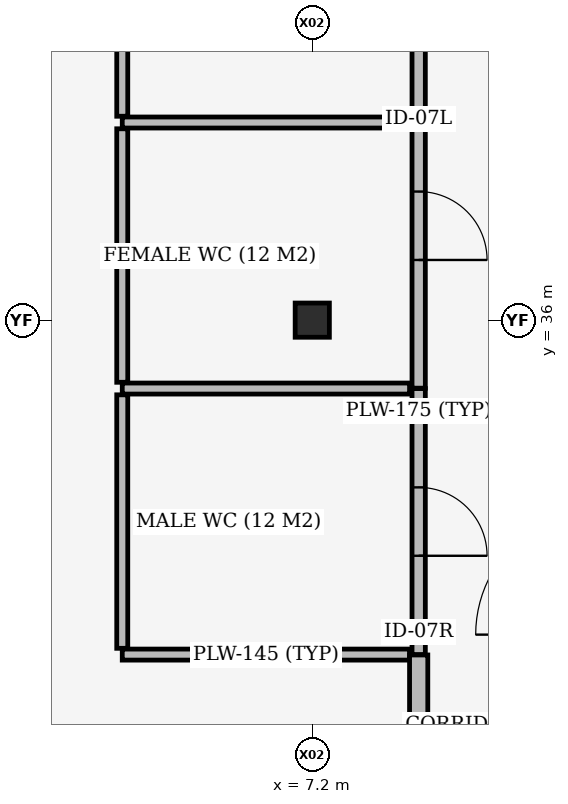
"""IFC4 building model, lengths in metres.
Left out: names, types, materials, properties, quantities, classifications, styles, units other than length and angle.
Written with IfcOpenShell. Run it as: python <this file> out.ifc"""

import sys

from ifc_helpers import new_model, si_unit, direction, frame, frame_2d, origin, origin_2d, place, context, subcontext, project, spatial, rectangle, extrude, element, fill, save


model = new_model("IFC4")
c1 = context("Model", 3, precision=1e-05, world=origin(), true_north=direction((0.0, 1.0)))
c2 = subcontext(c1, "Body", "Model", "MODEL_VIEW")
j1 = project(units=[si_unit("LENGTHUNIT", "METRE"), si_unit("PLANEANGLEUNIT", "RADIAN")], contexts=[c1])
p1 = place(None, origin())
s1 = spatial("IfcSite", under=j1, at=p1, CompositionType="ELEMENT")
p2 = place(p1, origin())
s2 = spatial("IfcBuilding", under=s1, at=p2, CompositionType="ELEMENT")
p3 = place(p2, frame((0.0, 0.0, -4.5)))
s3 = spatial("IfcBuildingStorey", under=s2, at=p3, CompositionType="ELEMENT", Elevation=-4.5)
p4 = place(p3, frame((7.2, 36.0, -0.42), z_axis=(0.0, 0.0, 1.0), x_axis=(1.0, 0.0, 0.0)))
e1 = element("IfcColumn", 1, at=p4, inside=s3, PredefinedType="COLUMN", context=c2, shape_type="SweptSolid", body=[
    extrude(rectangle(XDim=0.45, YDim=0.45, at=origin_2d()), origin(), (0.0, 0.0, 1.0), 4.6),
])
p5 = place(p3, frame((8.6, 31.6, 0.0), z_axis=(0.0, 0.0, 1.0), x_axis=(0.0, 1.0, 0.0)))
e2 = element("IfcWall", 2, at=p5, inside=s3, PredefinedType="PLUMBINGWALL", context=c2, shape_type="SweptSolid", body=[
    extrude(rectangle(XDim=3.5, YDim=0.175, at=frame_2d((1.75, 0.0))), origin(), (0.0, 0.0, 1.0), 4.18),
])
p6 = place(p5, frame((1.3, 0.0, 0.0)))
e3 = element("IfcOpeningElement", 3, at=p6, cuts=e2, PredefinedType="OPENING", context=c2, shape_type="SweptSolid", body=[
    extrude(rectangle(XDim=0.9, YDim=2.1, at=frame_2d((0.45, 1.05))), frame((0.0, 0.097, 0.0), z_axis=(0.0, -1.0, 0.0), x_axis=(1.0, 0.0, 0.0)), (0.0, 0.0, 1.0), 0.195),
])
for number, where, z_axis, x_axis in (
    (4, (4.7, 31.6, 0.0), (0.0, 0.0, 1.0), (1.0, 0.0, 0.0)),
    (5, (4.7, 35.1, 0.0), (0.0, 0.0, 1.0), (1.0, 0.0, 0.0)),
):
    element("IfcWall", number, at=place(p3, frame(where, z_axis=z_axis, x_axis=x_axis)), inside=s3, PredefinedType="PLUMBINGWALL", context=c2, shape_type="SweptSolid", body=[
        extrude(rectangle(XDim=3.78, YDim=0.145, at=frame_2d((1.89, 0.0))), origin(), (0.0, 0.0, 1.0), 3.43),
    ])
p7 = place(p3, frame((4.7, 31.683, 0.0), z_axis=(0.0, 0.0, 1.0), x_axis=(0.0, 1.0, 0.0)))
e6 = element("IfcWall", 6, at=p7, inside=s3, PredefinedType="PLUMBINGWALL", context=c2, shape_type="SweptSolid", body=[
    extrude(rectangle(XDim=3.335, YDim=0.145, at=frame_2d((1.667, 0.0))), origin(), (0.0, 0.0, 1.0), 3.73),
])
p8 = place(p3, frame((8.6, 35.105, 0.0), z_axis=(0.0, 0.0, 1.0), x_axis=(0.0, 1.0, 0.0)))
e7 = element("IfcWall", 7, at=p8, inside=s3, PredefinedType="PLUMBINGWALL", context=c2, shape_type="SweptSolid", body=[
    extrude(rectangle(XDim=3.495, YDim=0.175, at=frame_2d((1.748, 0.0))), origin(), (0.0, 0.0, 1.0), 3.48),
])
p9 = place(p8, frame((1.687, 0.0, 0.0)))
e8 = element("IfcOpeningElement", 8, at=p9, cuts=e7, PredefinedType="OPENING", context=c2, shape_type="SweptSolid", body=[
    extrude(rectangle(XDim=0.9, YDim=2.1, at=frame_2d((0.45, 1.05))), frame((0.0, 0.097, 0.0), z_axis=(0.0, -1.0, 0.0), x_axis=(1.0, 0.0, 0.0)), (0.0, 0.0, 1.0), 0.195),
])
p10 = place(p3, frame((4.7, 38.6, 0.0), z_axis=(0.0, 0.0, 1.0), x_axis=(1.0, 0.0, 0.0)))
e9 = element("IfcWall", 9, at=p10, inside=s3, PredefinedType="PLUMBINGWALL", context=c2, shape_type="SweptSolid", body=[
    extrude(rectangle(XDim=3.78, YDim=0.145, at=frame_2d((1.89, 0.0))), origin(), (0.0, 0.0, 1.0), 3.38),
])
p11 = place(p3, frame((4.7, 35.183, 0.0), z_axis=(0.0, 0.0, 1.0), x_axis=(0.0, 1.0, 0.0)))
e10 = element("IfcWall", 10, at=p11, inside=s3, PredefinedType="PLUMBINGWALL", context=c2, shape_type="SweptSolid", body=[
    extrude(rectangle(XDim=3.335, YDim=0.145, at=frame_2d((1.667, 0.0))), origin(), (0.0, 0.0, 1.0), 3.53),
])
p12 = place(p3, frame((8.6, 38.605, 0.0), z_axis=(0.0, 0.0, 1.0), x_axis=(0.0, 1.0, 0.0)))
e11 = element("IfcWall", 11, at=p12, inside=s3, PredefinedType="PLUMBINGWALL", context=c2, shape_type="SweptSolid", body=[
    extrude(rectangle(XDim=2.995, YDim=0.175, at=frame_2d((1.498, 0.0))), origin(), (0.0, 0.0, 1.0), 4.18),
])
p13 = place(p12, frame((1.038, 0.0, 0.0)))
e12 = element("IfcOpeningElement", 12, at=p13, cuts=e11, PredefinedType="OPENING", context=c2, shape_type="SweptSolid", body=[
    extrude(rectangle(XDim=0.92, YDim=2.1, at=frame_2d((0.46, 1.05))), frame((0.0, 0.097, 0.0), z_axis=(0.0, -1.0, 0.0), x_axis=(1.0, 0.0, 0.0)), (0.0, 0.0, 1.0), 0.195),
])
p14 = place(p3, frame((4.7, 38.683, 0.0), z_axis=(0.0, 0.0, 1.0), x_axis=(0.0, 1.0, 0.0)))
e13 = element("IfcWall", 13, at=p14, inside=s3, PredefinedType="PLUMBINGWALL", context=c2, shape_type="SweptSolid", body=[
    extrude(rectangle(XDim=2.835, YDim=0.145, at=frame_2d((1.417, 0.0))), origin(), (0.0, 0.0, 1.0), 3.94),
])
p15 = place(p3, frame((8.6, 23.0, 0.0), z_axis=(0.0, 0.0, 1.0), x_axis=(0.0, 1.0, 0.0)))
e14 = element("IfcWall", 14, at=p15, inside=s3, PredefinedType="STANDARD", context=c2, shape_type="SweptSolid", body=[
    extrude(rectangle(XDim=8.595, YDim=0.24, at=frame_2d((4.297, 0.0))), origin(), (0.0, 0.0, 1.0), 3.53),
])
p16 = place(p15, frame((3.472, 0.0, 0.0)))
e15 = element("IfcOpeningElement", 15, at=p16, cuts=e14, PredefinedType="OPENING", context=c2, shape_type="SweptSolid", body=[
    extrude(rectangle(XDim=1.65, YDim=2.25, at=frame_2d((0.825, 1.125))), frame((0.0, 0.13, 0.0), z_axis=(0.0, -1.0, 0.0), x_axis=(1.0, 0.0, 0.0)), (0.0, 0.0, 1.0), 0.26),
])
p17 = place(p6, origin())
e16 = element("IfcDoor", 16, at=p17, inside=s3, OperationType="SINGLE_SWING_RIGHT", PredefinedType="DOOR", context=c2, shape_type="SweptSolid", body=[
    extrude(rectangle(XDim=0.9, YDim=2.1, at=frame_2d((0.45, 1.05))), frame((0.0, 0.025, 0.0), z_axis=(0.0, -1.0, 0.0), x_axis=(1.0, 0.0, 0.0)), (0.0, 0.0, 1.0), 0.05),
])
fill(e3, e16)
p18 = place(p9, origin())
e17 = element("IfcDoor", 17, at=p18, inside=s3, OperationType="SINGLE_SWING_RIGHT", PredefinedType="DOOR", context=c2, shape_type="SweptSolid", body=[
    extrude(rectangle(XDim=0.9, YDim=2.1, at=frame_2d((0.45, 1.05))), frame((0.0, 0.025, 0.0), z_axis=(0.0, -1.0, 0.0), x_axis=(1.0, 0.0, 0.0)), (0.0, 0.0, 1.0), 0.05),
])
fill(e8, e17)
save(model, sys.argv[1])
